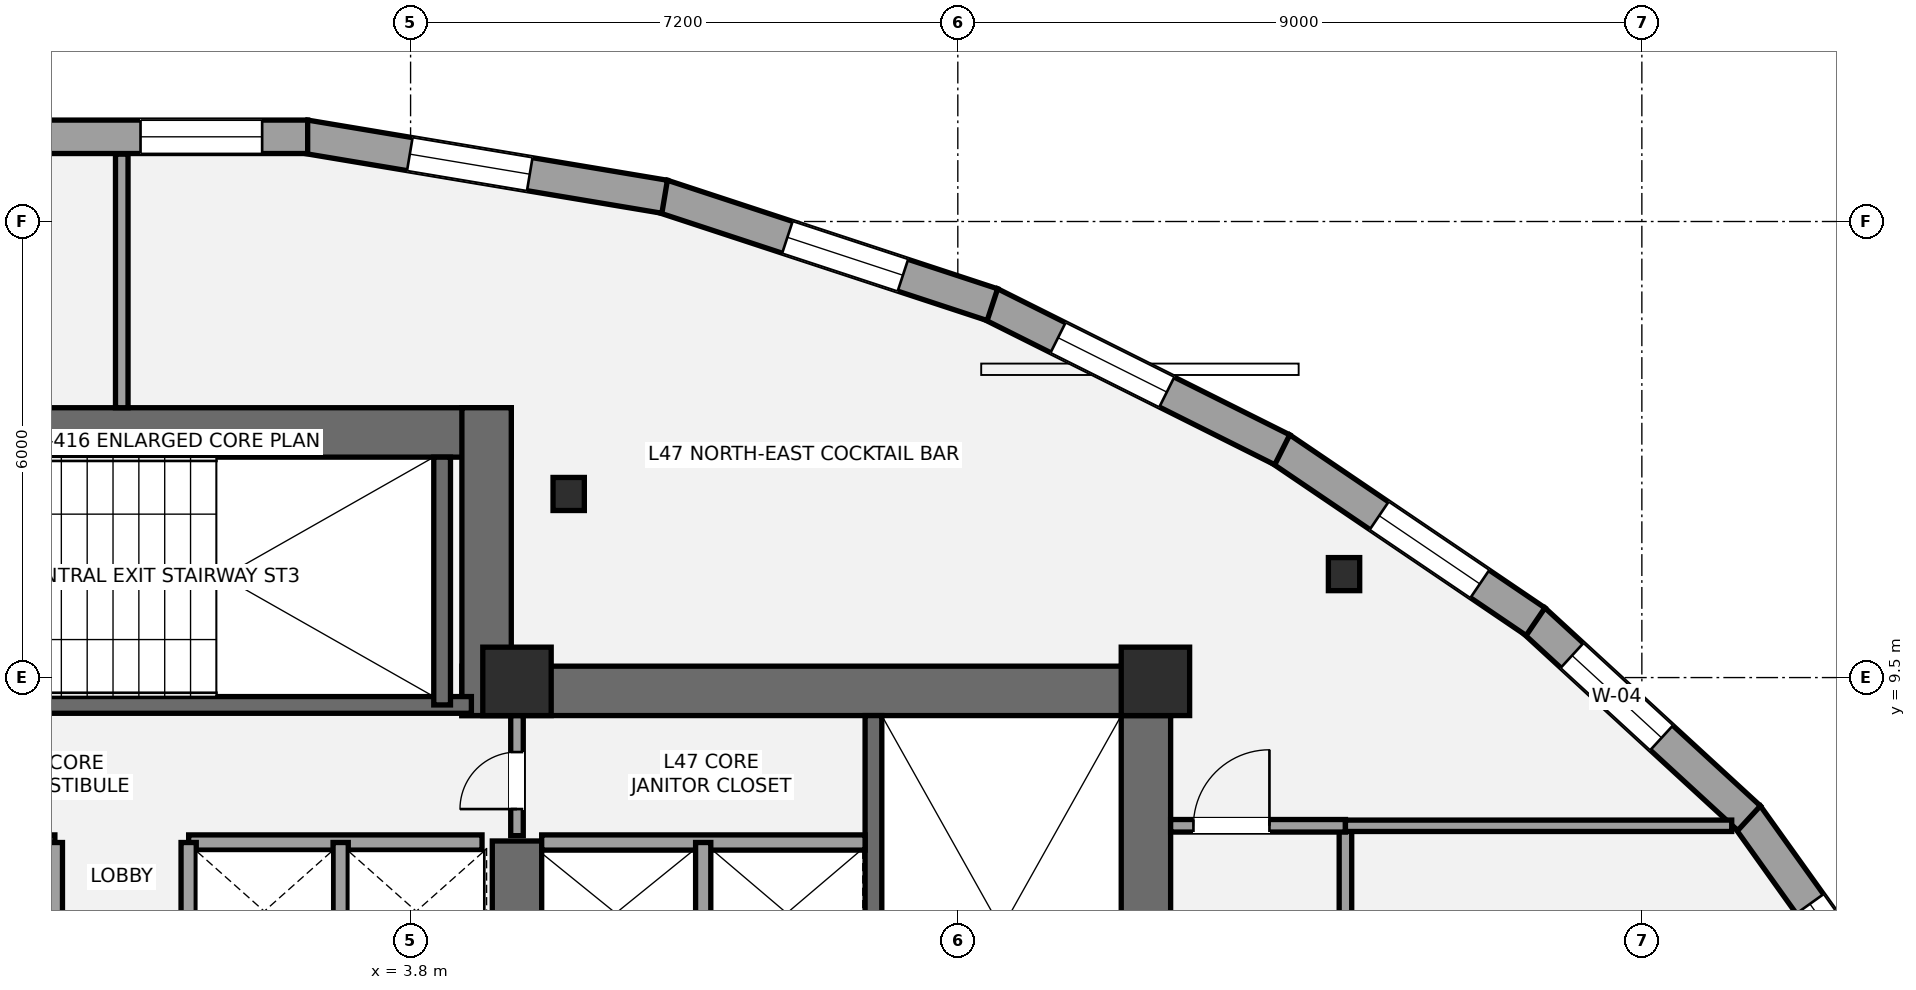
"""IFC4 building model, lengths in metres.
Left out: names, types, materials, properties, quantities, classifications, styles, units other than length and angle.
Written with IfcOpenShell. Run it as: python <this file> out.ifc"""

import sys

from ifc_helpers import new_model, si_unit, direction, frame, frame_2d, origin, origin_2d, place, context, subcontext, project, spatial, rectangle, i_section, extrude, element, fill, save


model = new_model("IFC4")
c1 = context("Model", 3, precision=1e-05, world=origin(), true_north=direction((0.0, 1.0)))
c2 = subcontext(c1, "Body", "Model", "MODEL_VIEW")
j1 = project(units=[si_unit("LENGTHUNIT", "METRE"), si_unit("PLANEANGLEUNIT", "RADIAN")], contexts=[c1])
p1 = place(None, origin())
s1 = spatial("IfcSite", under=j1, at=p1, CompositionType="ELEMENT")
p2 = place(p1, origin())
s2 = spatial("IfcBuilding", under=s1, at=p2, CompositionType="ELEMENT")
p3 = place(p2, frame((0.0, 0.0, 172.6)))
s3 = spatial("IfcBuildingStorey", under=s2, at=p3, CompositionType="ELEMENT", Elevation=172.6)
p4 = place(p3, frame((13.475, 1.2, 0.0), z_axis=(0.0, 0.0, 1.0), x_axis=(0.0, 1.0, 0.0)))
e1 = element("IfcWall", 1, at=p4, inside=s3, PredefinedType="SHEAR", context=c2, shape_type="SweptSolid", body=[
    extrude(rectangle(XDim=8.45, YDim=0.65, at=frame_2d((4.225, 0.0))), origin(), (0.0, 0.0, 1.0), 3.2),
])
p5 = place(p3, frame((4.475, 9.325, 0.0), z_axis=(0.0, 0.0, 1.0), x_axis=(1.0, 0.0, 0.0)))
e2 = element("IfcWall", 2, at=p5, inside=s3, PredefinedType="SHEAR", context=c2, shape_type="SweptSolid", body=[
    extrude(rectangle(XDim=9.325, YDim=0.65, at=frame_2d((4.663, 0.0))), origin(), (0.0, 0.0, 1.0), 3.2),
])
p6 = place(p3, frame((5.2, 5.35, 0.0), z_axis=(0.0, 0.0, 1.0), x_axis=(0.0, 1.0, 0.0)))
e3 = element("IfcWall", 3, at=p6, inside=s3, PredefinedType="SHEAR", context=c2, shape_type="SweptSolid", body=[
    extrude(rectangle(XDim=2.0, YDim=0.65, at=frame_2d((1.0, 0.0))), origin(), (0.0, 0.0, 1.0), 3.2),
])
p7 = place(p3, frame((9.89, 1.85, 0.0), z_axis=(0.0, 0.0, 1.0), x_axis=(0.0, 1.0, 0.0)))
e4 = element("IfcWall", 4, at=p7, inside=s3, PredefinedType="SHEAR", context=c2, shape_type="SweptSolid", body=[
    extrude(rectangle(XDim=7.15, YDim=0.22, at=frame_2d((3.575, 0.0))), origin(), (0.0, 0.0, 1.0), 3.2),
])
p8 = place(p3, frame((-5.125, 12.725, 0.0), z_axis=(0.0, 0.0, 1.0), x_axis=(1.0, 0.0, 0.0)))
e5 = element("IfcWall", 5, at=p8, inside=s3, PredefinedType="SHEAR", context=c2, shape_type="SweptSolid", body=[
    extrude(rectangle(XDim=10.25, YDim=0.65, at=frame_2d((5.125, 0.0))), origin(), (0.0, 0.0, 1.0), 3.2),
])
p9 = place(p3, frame((4.8, 9.0, 0.0), z_axis=(0.0, 0.0, 1.0), x_axis=(0.0, 1.0, 0.0)))
e6 = element("IfcWall", 6, at=p9, inside=s3, PredefinedType="SHEAR", context=c2, shape_type="SweptSolid", body=[
    extrude(rectangle(XDim=4.05, YDim=0.65, at=frame_2d((2.025, 0.0))), origin(), (0.0, 0.0, 1.0), 3.2),
])
p10 = place(p3, frame((-4.7, 9.14, 0.0), z_axis=(0.0, 0.0, 1.0), x_axis=(1.0, 0.0, 0.0)))
e7 = element("IfcWall", 7, at=p10, inside=s3, PredefinedType="SHEAR", context=c2, shape_type="SweptSolid", body=[
    extrude(rectangle(XDim=9.3, YDim=0.22, at=frame_2d((4.65, 0.0))), origin(), (0.0, 0.0, 1.0), 3.2),
])
p11 = place(p10, frame((1.15, 0.0, 0.0)))
e8 = element("IfcOpeningElement", 8, at=p11, cuts=e7, PredefinedType="OPENING", context=c2, shape_type="SweptSolid", body=[
    extrude(rectangle(XDim=1.05, YDim=2.15, at=frame_2d((0.525, 1.075))), frame((0.0, 0.12, 0.0), z_axis=(0.0, -1.0, 0.0), x_axis=(1.0, 0.0, 0.0)), (0.0, 0.0, 1.0), 0.24),
])
p12 = place(p3, frame((4.215, 9.14, 0.0), z_axis=(0.0, 0.0, 1.0), x_axis=(0.0, 1.0, 0.0)))
e9 = element("IfcWall", 9, at=p12, inside=s3, PredefinedType="SHEAR", context=c2, shape_type="SweptSolid", body=[
    extrude(rectangle(XDim=3.26, YDim=0.22, at=frame_2d((1.63, 0.0))), origin(), (0.0, 0.0, 1.0), 3.2),
])
for number, where, z_axis, x_axis in (
    (10, (5.2, 9.45, 0.0), (0.0, 0.0, 1.0), (1.0, 0.0, 0.0)),
    (11, (13.6, 9.45, 0.0), (0.0, 0.0, 1.0), (1.0, 0.0, 0.0)),
):
    element("IfcColumn", number, at=place(p3, frame(where, z_axis=z_axis, x_axis=x_axis)), inside=s3, PredefinedType="COLUMN", context=c2, shape_type="SweptSolid", body=[
        extrude(rectangle(XDim=0.9, YDim=0.9, at=origin_2d()), origin(), (0.0, 0.0, 1.0), 3.2),
    ])
for number, where, z_axis, x_axis in (
    (12, (16.082, 10.861, 0.0), (0.0, 0.0, 1.0), (1.0, 0.0, 0.0)),
    (13, (5.88, 11.915, 0.0), (0.0, 0.0, 1.0), (1.0, 0.0, 0.0)),
):
    element("IfcColumn", number, at=place(p3, frame(where, z_axis=z_axis, x_axis=x_axis)), inside=s3, PredefinedType="COLUMN", context=c2, shape_type="SweptSolid", body=[
        extrude(i_section(OverallWidth=0.412, OverallDepth=0.435, WebThickness=0.036, FlangeThickness=0.057, at=origin_2d()), origin(), (0.0, 0.0, 1.0), 3.2),
    ])
p13 = place(p3, frame((21.38, 7.684, 0.0), z_axis=(0.0, 0.0, 1.0), x_axis=(0.581678195571, -0.813419004448, 0.0)))
e14 = element("IfcWall", 14, at=p13, inside=s3, PredefinedType="STANDARD", context=c2, shape_type="SweptSolid", body=[
    extrude(rectangle(XDim=3.621, YDim=0.44, at=frame_2d((1.811, 0.0))), origin(), (0.0, 0.0, 1.0), 2.315),
])
p14 = place(p13, frame((1.428, 0.0, 0.58)))
e15 = element("IfcOpeningElement", 15, at=p14, cuts=e14, PredefinedType="OPENING", context=c2, shape_type="SweptSolid", body=[
    extrude(rectangle(XDim=1.6, YDim=1.55, at=frame_2d((0.8, 0.775))), frame((0.0, 0.23, 0.0), z_axis=(0.0, -1.0, 0.0), x_axis=(1.0, 0.0, 0.0)), (0.0, 0.0, 1.0), 0.46),
])
p15 = place(p3, frame((18.576, 10.255, 0.0), z_axis=(0.0, 0.0, 1.0), x_axis=(0.736282263947, -0.676674536093, 0.0)))
e16 = element("IfcWall", 16, at=p15, inside=s3, PredefinedType="STANDARD", context=c2, shape_type="SweptSolid", body=[
    extrude(rectangle(XDim=3.85, YDim=0.44, at=frame_2d((1.925, 0.0))), origin(), (0.0, 0.0, 1.0), 2.315),
])
p16 = place(p15, frame((0.687, 0.0, 0.58)))
e17 = element("IfcOpeningElement", 17, at=p16, cuts=e16, PredefinedType="OPENING", context=c2, shape_type="SweptSolid", body=[
    extrude(rectangle(XDim=1.6, YDim=1.55, at=frame_2d((0.8, 0.775))), frame((0.0, 0.23, 0.0), z_axis=(0.0, -1.0, 0.0), x_axis=(1.0, 0.0, 0.0)), (0.0, 0.0, 1.0), 0.46),
])
p17 = place(p3, frame((15.243, 12.511, 0.0), z_axis=(0.0, 0.0, 1.0), x_axis=(0.827757295322, -0.561086321382, 0.0)))
e18 = element("IfcWall", 18, at=p17, inside=s3, PredefinedType="STANDARD", context=c2, shape_type="SweptSolid", body=[
    extrude(rectangle(XDim=4.057, YDim=0.44, at=frame_2d((2.028, 0.0))), origin(), (0.0, 0.0, 1.0), 2.315),
])
p18 = place(p17, frame((1.571, 0.0, 0.58)))
e19 = element("IfcOpeningElement", 19, at=p18, cuts=e18, PredefinedType="OPENING", context=c2, shape_type="SweptSolid", body=[
    extrude(rectangle(XDim=1.6, YDim=1.55, at=frame_2d((0.8, 0.775))), frame((0.0, 0.23, 0.0), z_axis=(0.0, -1.0, 0.0), x_axis=(1.0, 0.0, 0.0)), (0.0, 0.0, 1.0), 0.46),
])
p19 = place(p3, frame((11.425, 14.418, 0.0), z_axis=(0.0, 0.0, 1.0), x_axis=(0.894427191, -0.4472135955, 0.0)))
e20 = element("IfcWall", 20, at=p19, inside=s3, PredefinedType="STANDARD", context=c2, shape_type="SweptSolid", body=[
    extrude(rectangle(XDim=4.297, YDim=0.44, at=frame_2d((2.148, 0.0))), origin(), (0.0, 0.0, 1.0), 2.315),
])
p20 = place(p19, frame((0.999, 0.0, 0.58)))
e21 = element("IfcOpeningElement", 21, at=p20, cuts=e20, PredefinedType="OPENING", context=c2, shape_type="SweptSolid", body=[
    extrude(rectangle(XDim=1.6, YDim=1.55, at=frame_2d((0.8, 0.775))), frame((0.0, 0.23, 0.0), z_axis=(0.0, -1.0, 0.0), x_axis=(1.0, 0.0, 0.0)), (0.0, 0.0, 1.0), 0.46),
])
p21 = place(p3, frame((7.11, 15.834, 0.0), z_axis=(0.0, 0.0, 1.0), x_axis=(0.950025190485, -0.312173249084, 0.0)))
e22 = element("IfcWall", 22, at=p21, inside=s3, PredefinedType="STANDARD", context=c2, shape_type="SweptSolid", body=[
    extrude(rectangle(XDim=4.573, YDim=0.44, at=frame_2d((2.287, 0.0))), origin(), (0.0, 0.0, 1.0), 2.315),
])
p22 = place(p21, frame((1.734, 0.0, 0.58)))
e23 = element("IfcOpeningElement", 23, at=p22, cuts=e22, PredefinedType="OPENING", context=c2, shape_type="SweptSolid", body=[
    extrude(rectangle(XDim=1.6, YDim=1.55, at=frame_2d((0.8, 0.775))), frame((0.0, 0.23, 0.0), z_axis=(0.0, -1.0, 0.0), x_axis=(1.0, 0.0, 0.0)), (0.0, 0.0, 1.0), 0.46),
])
p23 = place(p3, frame((2.41, 16.617, 0.0), z_axis=(0.0, 0.0, 1.0), x_axis=(0.98630301983, -0.164943484488, 0.0)))
e24 = element("IfcWall", 24, at=p23, inside=s3, PredefinedType="STANDARD", context=c2, shape_type="SweptSolid", body=[
    extrude(rectangle(XDim=4.799, YDim=0.44, at=frame_2d((2.399, 0.0))), origin(), (0.0, 0.0, 1.0), 2.315),
])
p24 = place(p23, frame((1.399, 0.0, 0.58)))
e25 = element("IfcOpeningElement", 25, at=p24, cuts=e24, PredefinedType="OPENING", context=c2, shape_type="SweptSolid", body=[
    extrude(rectangle(XDim=1.6, YDim=1.55, at=frame_2d((0.8, 0.775))), frame((0.0, 0.23, 0.0), z_axis=(0.0, -1.0, 0.0), x_axis=(1.0, 0.0, 0.0)), (0.0, 0.0, 1.0), 0.46),
])
p25 = place(p3, frame((-2.446, 16.614, 0.0), z_axis=(0.0, 0.0, 1.0), x_axis=(1.0, 0.0, 0.0)))
e26 = element("IfcWall", 26, at=p25, inside=s3, PredefinedType="STANDARD", context=c2, shape_type="SweptSolid", body=[
    extrude(rectangle(XDim=4.892, YDim=0.44, at=frame_2d((2.446, 0.0))), origin(), (0.0, 0.0, 1.0), 2.315),
])
p26 = place(p25, frame((2.693, 0.0, 0.58)))
e27 = element("IfcOpeningElement", 27, at=p26, cuts=e26, PredefinedType="OPENING", context=c2, shape_type="SweptSolid", body=[
    extrude(rectangle(XDim=1.6, YDim=1.55, at=frame_2d((0.8, 0.775))), frame((0.0, 0.23, 0.0), z_axis=(0.0, -1.0, 0.0), x_axis=(1.0, 0.0, 0.0)), (0.0, 0.0, 1.0), 0.46),
])
p27 = place(p3, frame((5.525, 7.33, 0.0), z_axis=(0.0, 0.0, 1.0), x_axis=(1.0, 0.0, 0.0)))
e28 = element("IfcWall", 28, at=p27, inside=s3, PredefinedType="SOLIDWALL", context=c2, shape_type="SweptSolid", body=[
    extrude(rectangle(XDim=4.255, YDim=0.2, at=frame_2d((2.127, 0.0))), origin(), (0.0, 0.0, 1.0), 3.02),
])
p28 = place(p3, frame((7.65, 5.47, 0.0), z_axis=(0.0, 0.0, 1.0), x_axis=(0.0, 1.0, 0.0)))
e29 = element("IfcWall", 29, at=p28, inside=s3, PredefinedType="SOLIDWALL", context=c2, shape_type="SweptSolid", body=[
    extrude(rectangle(XDim=1.86, YDim=0.2, at=frame_2d((0.93, 0.0))), origin(), (0.0, 0.0, 1.0), 3.02),
])
for number, where, z_axis, x_axis in (
    (30, (-4.74, 7.33, 0.0), (0.0, 0.0, 1.0), (1.0, 0.0, 0.0)),
    (31, (0.88, 7.33, 0.0), (0.0, 0.0, 1.0), (1.0, 0.0, 0.0)),
):
    element("IfcWall", number, at=place(p3, frame(where, z_axis=z_axis, x_axis=x_axis)), inside=s3, PredefinedType="SOLIDWALL", context=c2, shape_type="SweptSolid", body=[
        extrude(rectangle(XDim=3.86, YDim=0.2, at=frame_2d((1.93, 0.0))), origin(), (0.0, 0.0, 1.0), 3.02),
    ])
for number, where, z_axis, x_axis in (
    (32, (2.88, 5.52, 0.0), (0.0, 0.0, 1.0), (0.0, 1.0, 0.0)),
    (33, (-0.88, 5.52, 0.0), (0.0, 0.0, 1.0), (0.0, 1.0, 0.0)),
    (34, (0.88, 5.52, 0.0), (0.0, 0.0, 1.0), (0.0, 1.0, 0.0)),
):
    element("IfcWall", number, at=place(p3, frame(where, z_axis=z_axis, x_axis=x_axis)), inside=s3, PredefinedType="SOLIDWALL", context=c2, shape_type="SweptSolid", body=[
        extrude(rectangle(XDim=1.81, YDim=0.2, at=frame_2d((0.905, 0.0))), origin(), (0.0, 0.0, 1.0), 3.02),
    ])
p29 = place(p3, frame((5.2, 7.42, 0.0), z_axis=(0.0, 0.0, 1.0), x_axis=(0.0, 1.0, 0.0)))
e35 = element("IfcWall", 35, at=p29, inside=s3, PredefinedType="PARTITIONING", context=c2, shape_type="SweptSolid", body=[
    extrude(rectangle(XDim=1.58, YDim=0.165, at=frame_2d((0.79, 0.0))), origin(), (0.0, 0.0, 1.0), 3.02),
])
p30 = place(p29, frame((0.35, 0.0, 0.0)))
e36 = element("IfcOpeningElement", 36, at=p30, cuts=e35, PredefinedType="OPENING", context=c2, shape_type="SweptSolid", body=[
    extrude(rectangle(XDim=0.75, YDim=2.1, at=frame_2d((0.375, 1.05))), frame((0.0, 0.093, 0.0), z_axis=(0.0, -1.0, 0.0), x_axis=(1.0, 0.0, 0.0)), (0.0, 0.0, 1.0), 0.185),
])
p31 = place(p3, frame((16.1, -11.655, 0.0), z_axis=(0.0, 0.0, 1.0), x_axis=(0.0, 1.0, 0.0)))
e37 = element("IfcWall", 37, at=p31, inside=s3, PredefinedType="PARTITIONING", context=c2, shape_type="SweptSolid", body=[
    extrude(rectangle(XDim=19.205, YDim=0.165, at=frame_2d((9.603, 0.0))), origin(), (0.0, 0.0, 1.0), 2.473),
])
p32 = place(p31, frame((3.706, 0.0, 0.0)))
e38 = element("IfcOpeningElement", 38, at=p32, cuts=e37, PredefinedType="OPENING", context=c2, shape_type="SweptSolid", body=[
    extrude(rectangle(XDim=0.85, YDim=2.1, at=frame_2d((0.425, 1.05))), frame((0.0, 0.093, 0.0), z_axis=(0.0, -1.0, 0.0), x_axis=(1.0, 0.0, 0.0)), (0.0, 0.0, 1.0), 0.185),
])
p33 = place(p31, frame((7.596, 0.0, 0.0)))
e39 = element("IfcOpeningElement", 39, at=p33, cuts=e37, PredefinedType="OPENING", context=c2, shape_type="SweptSolid", body=[
    extrude(rectangle(XDim=1.0, YDim=2.15, at=frame_2d((0.5, 1.075))), frame((0.0, 0.093, 0.0), z_axis=(0.0, -1.0, 0.0), x_axis=(1.0, 0.0, 0.0)), (0.0, 0.0, 1.0), 0.185),
])
p34 = place(p31, frame((12.256, 0.0, 0.0)))
e40 = element("IfcOpeningElement", 40, at=p34, cuts=e37, PredefinedType="OPENING", context=c2, shape_type="SweptSolid", body=[
    extrude(rectangle(XDim=1.0, YDim=2.15, at=frame_2d((0.5, 1.075))), frame((0.0, 0.093, 0.0), z_axis=(0.0, -1.0, 0.0), x_axis=(1.0, 0.0, 0.0)), (0.0, 0.0, 1.0), 0.185),
])
p35 = place(p31, frame((16.531, 0.0, 0.0)))
e41 = element("IfcOpeningElement", 41, at=p35, cuts=e37, PredefinedType="OPENING", context=c2, shape_type="SweptSolid", body=[
    extrude(rectangle(XDim=1.0, YDim=2.15, at=frame_2d((0.5, 1.075))), frame((0.0, 0.093, 0.0), z_axis=(0.0, -1.0, 0.0), x_axis=(1.0, 0.0, 0.0)), (0.0, 0.0, 1.0), 0.185),
])
p36 = place(p3, frame((13.8, 7.55, 0.0), z_axis=(0.0, 0.0, 1.0), x_axis=(1.0, 0.0, 0.0)))
e42 = element("IfcWall", 42, at=p36, inside=s3, PredefinedType="PARTITIONING", context=c2, shape_type="SweptSolid", body=[
    extrude(rectangle(XDim=2.3, YDim=0.165, at=frame_2d((1.15, 0.0))), origin(), (0.0, 0.0, 1.0), 3.02),
])
p37 = place(p36, frame((0.3, 0.0, 0.0)))
e43 = element("IfcOpeningElement", 43, at=p37, cuts=e42, PredefinedType="OPENING", context=c2, shape_type="SweptSolid", body=[
    extrude(rectangle(XDim=1.0, YDim=2.15, at=frame_2d((0.5, 1.075))), frame((0.0, 0.093, 0.0), z_axis=(0.0, -1.0, 0.0), x_axis=(1.0, 0.0, 0.0)), (0.0, 0.0, 1.0), 0.185),
])
p38 = place(p3, frame((16.1, 7.55, 0.0), z_axis=(0.0, 0.0, 1.0), x_axis=(1.0, 0.0, 0.0)))
e44 = element("IfcWall", 44, at=p38, inside=s3, PredefinedType="PLUMBINGWALL", context=c2, shape_type="SweptSolid", body=[
    extrude(rectangle(XDim=5.082, YDim=0.15, at=frame_2d((2.541, 0.0))), origin(), (0.0, 0.0, 1.0), 2.473),
])
p39 = place(p3, frame((0.0, 13.05, 0.0), z_axis=(0.0, 0.0, 1.0), x_axis=(0.0, 1.0, 0.0)))
e45 = element("IfcWall", 45, at=p39, inside=s3, PredefinedType="PARTITIONING", context=c2, shape_type="SweptSolid", body=[
    extrude(rectangle(XDim=3.336, YDim=0.165, at=frame_2d((1.668, 0.0))), origin(), (0.0, 0.0, 1.0), 3.02),
])
p40 = place(p14, origin())
e46 = element("IfcWindow", 46, at=p40, inside=s3, PartitioningType="SINGLE_PANEL", PredefinedType="WINDOW", context=c2, shape_type="SweptSolid", body=[
    extrude(rectangle(XDim=1.6, YDim=1.55, at=frame_2d((0.8, 0.775))), frame((0.0, -0.01, 0.0), z_axis=(0.0, -1.0, 0.0), x_axis=(1.0, 0.0, 0.0)), (0.0, 0.0, 1.0), 0.06),
])
fill(e15, e46)
p41 = place(p16, origin())
e47 = element("IfcWindow", 47, at=p41, inside=s3, PartitioningType="SINGLE_PANEL", PredefinedType="WINDOW", context=c2, shape_type="SweptSolid", body=[
    extrude(rectangle(XDim=1.6, YDim=1.55, at=frame_2d((0.8, 0.775))), frame((0.0, -0.01, 0.0), z_axis=(0.0, -1.0, 0.0), x_axis=(1.0, 0.0, 0.0)), (0.0, 0.0, 1.0), 0.06),
])
fill(e17, e47)
p42 = place(p18, origin())
e48 = element("IfcWindow", 48, at=p42, inside=s3, PartitioningType="SINGLE_PANEL", PredefinedType="WINDOW", context=c2, shape_type="SweptSolid", body=[
    extrude(rectangle(XDim=1.6, YDim=1.55, at=frame_2d((0.8, 0.775))), frame((0.0, -0.01, 0.0), z_axis=(0.0, -1.0, 0.0), x_axis=(1.0, 0.0, 0.0)), (0.0, 0.0, 1.0), 0.06),
])
fill(e19, e48)
p43 = place(p20, origin())
e49 = element("IfcWindow", 49, at=p43, inside=s3, PartitioningType="SINGLE_PANEL", PredefinedType="WINDOW", context=c2, shape_type="SweptSolid", body=[
    extrude(rectangle(XDim=1.6, YDim=1.55, at=frame_2d((0.8, 0.775))), frame((0.0, -0.01, 0.0), z_axis=(0.0, -1.0, 0.0), x_axis=(1.0, 0.0, 0.0)), (0.0, 0.0, 1.0), 0.06),
])
fill(e21, e49)
p44 = place(p22, origin())
e50 = element("IfcWindow", 50, at=p44, inside=s3, PartitioningType="SINGLE_PANEL", PredefinedType="WINDOW", context=c2, shape_type="SweptSolid", body=[
    extrude(rectangle(XDim=1.6, YDim=1.55, at=frame_2d((0.8, 0.775))), frame((0.0, -0.01, 0.0), z_axis=(0.0, -1.0, 0.0), x_axis=(1.0, 0.0, 0.0)), (0.0, 0.0, 1.0), 0.06),
])
fill(e23, e50)
p45 = place(p24, origin())
e51 = element("IfcWindow", 51, at=p45, inside=s3, PartitioningType="SINGLE_PANEL", PredefinedType="WINDOW", context=c2, shape_type="SweptSolid", body=[
    extrude(rectangle(XDim=1.6, YDim=1.55, at=frame_2d((0.8, 0.775))), frame((0.0, -0.01, 0.0), z_axis=(0.0, -1.0, 0.0), x_axis=(1.0, 0.0, 0.0)), (0.0, 0.0, 1.0), 0.06),
])
fill(e25, e51)
p46 = place(p26, origin())
e52 = element("IfcWindow", 52, at=p46, inside=s3, PartitioningType="SINGLE_PANEL", PredefinedType="WINDOW", context=c2, shape_type="SweptSolid", body=[
    extrude(rectangle(XDim=1.6, YDim=1.55, at=frame_2d((0.8, 0.775))), frame((0.0, -0.01, 0.0), z_axis=(0.0, -1.0, 0.0), x_axis=(1.0, 0.0, 0.0)), (0.0, 0.0, 1.0), 0.06),
])
fill(e27, e52)
p47 = place(p30, origin())
e53 = element("IfcDoor", 53, at=p47, inside=s3, OperationType="SINGLE_SWING_LEFT", PredefinedType="DOOR", context=c2, shape_type="SweptSolid", body=[
    extrude(rectangle(XDim=0.75, YDim=2.1, at=frame_2d((0.375, 1.05))), frame((0.0, 0.025, 0.0), z_axis=(0.0, -1.0, 0.0), x_axis=(1.0, 0.0, 0.0)), (0.0, 0.0, 1.0), 0.05),
])
fill(e36, e53)
p48 = place(p37, origin())
e54 = element("IfcDoor", 54, at=p48, inside=s3, OperationType="SINGLE_SWING_RIGHT", PredefinedType="DOOR", context=c2, shape_type="SweptSolid", body=[
    extrude(rectangle(XDim=1.0, YDim=2.15, at=frame_2d((0.5, 1.075))), frame((0.0, 0.025, 0.0), z_axis=(0.0, -1.0, 0.0), x_axis=(1.0, 0.0, 0.0)), (0.0, 0.0, 1.0), 0.05),
])
fill(e43, e54)
save(model, sys.argv[1])
